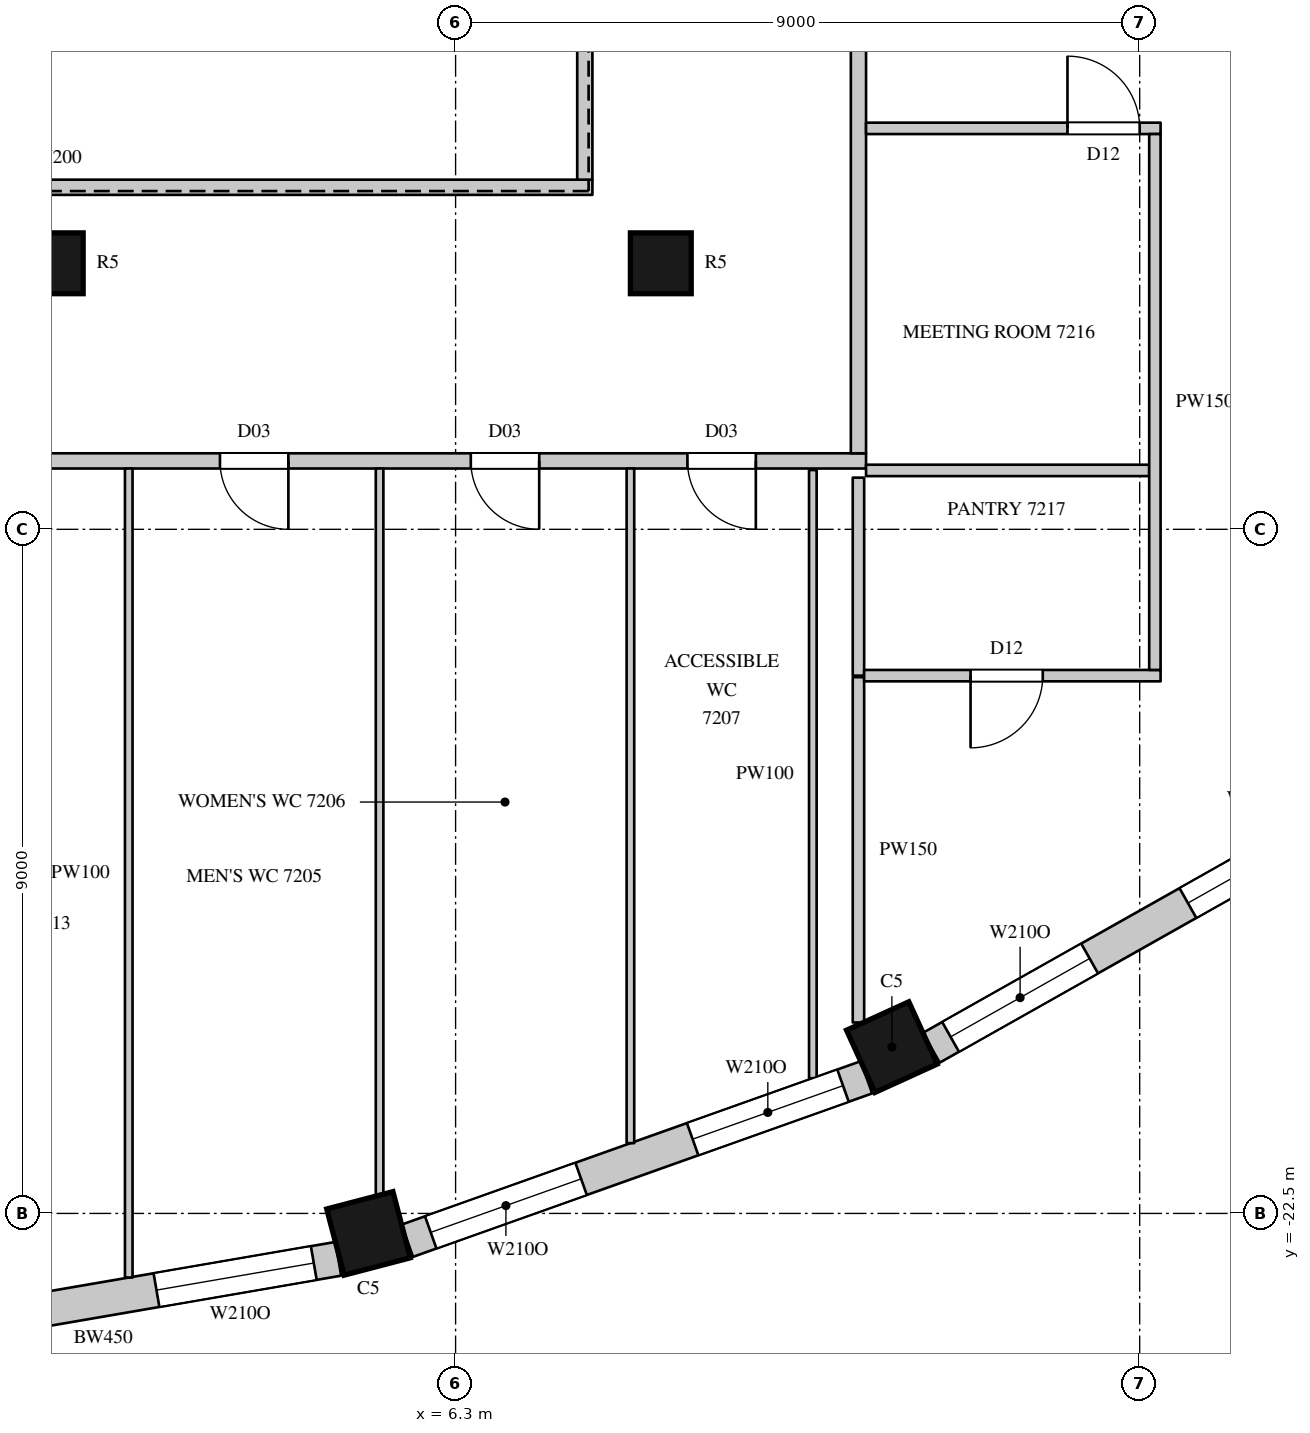
"""IFC4 building model, lengths in metres.
Left out: names, types, materials, properties, quantities, classifications, styles, units other than length and angle.
Written with IfcOpenShell. Run it as: python <this file> out.ifc"""

import sys

from ifc_helpers import new_model, si_unit, direction, frame, frame_2d, origin, origin_2d, place, context, subcontext, project, spatial, rectangle, circle, extrude, element, fill, save


model = new_model("IFC4")
c1 = context("Model", 3, precision=1e-05, world=origin(), true_north=direction((0.0, 1.0)))
c2 = subcontext(c1, "Body", "Model", "MODEL_VIEW")
j1 = project(units=[si_unit("LENGTHUNIT", "METRE"), si_unit("PLANEANGLEUNIT", "RADIAN")], contexts=[c1])
p1 = place(None, origin())
s1 = spatial("IfcSite", under=j1, at=p1, CompositionType="ELEMENT")
p2 = place(p1, origin())
s2 = spatial("IfcBuilding", under=s1, at=p2, CompositionType="ELEMENT")
p3 = place(p2, frame((0.0, 0.0, 317.2)))
s3 = spatial("IfcBuildingStorey", under=s2, at=p3, CompositionType="ELEMENT", Elevation=317.2)
for number, where, z_axis, x_axis in (
    (1, (5.154, -22.763, 0.0), (0.0, 0.0, 1.0), (0.967, 0.253, 0.0)),
    (2, (12.04, -20.312, 0.0), (0.0, 0.0, 1.0), (0.91, 0.415, 0.0)),
):
    element("IfcColumn", number, at=place(p3, frame(where, z_axis=z_axis, x_axis=x_axis)), inside=s3, PredefinedType="COLUMN", context=c2, shape_type="SweptSolid", body=[
        extrude(rectangle(XDim=0.9, YDim=0.9, at=origin_2d()), origin(), (0.0, 0.0, 1.0), 4.1),
    ])
for number, where, z_axis, x_axis in (
    (3, (1.0, -10.0, 0.0), (0.0, 0.0, 1.0), (1.0, 0.0, 0.0)),
    (4, (9.0, -10.0, 0.0), (0.0, 0.0, 1.0), (1.0, 0.0, 0.0)),
):
    element("IfcColumn", number, at=place(p3, frame(where, z_axis=z_axis, x_axis=x_axis)), inside=s3, PredefinedType="COLUMN", context=c2, shape_type="SweptSolid", body=[
        extrude(circle(Radius=0.4, at=origin_2d()), origin(), (0.0, 0.0, 1.0), 4.1),
    ])
p4 = place(p3, frame((-1.562, -24.185, 0.0), z_axis=(0.0, 0.0, 1.0), x_axis=(0.985502073964, 0.169663379113, 0.0)))
e5 = element("IfcWall", 5, at=p4, inside=s3, PredefinedType="SOLIDWALL", context=c2, shape_type="SweptSolid", body=[
    extrude(rectangle(XDim=6.412, YDim=0.45, at=frame_2d((3.206, 0.0))), origin(), (0.0, 0.0, 1.0), 3.8),
])
p5 = place(p4, frame((0.327, 0.0, 1.05)))
e6 = element("IfcOpeningElement", 6, at=p5, cuts=e5, PredefinedType="OPENING", context=c2, shape_type="SweptSolid", body=[
    extrude(rectangle(XDim=2.1, YDim=2.4, at=frame_2d((1.05, 1.2))), frame((0.0, 0.235, 0.0), z_axis=(0.0, -1.0, 0.0), x_axis=(1.0, 0.0, 0.0)), (0.0, 0.0, 1.0), 0.47),
])
p6 = place(p4, frame((3.985, 0.0, 1.05)))
e7 = element("IfcOpeningElement", 7, at=p6, cuts=e5, PredefinedType="OPENING", context=c2, shape_type="SweptSolid", body=[
    extrude(rectangle(XDim=2.1, YDim=2.4, at=frame_2d((1.05, 1.2))), frame((0.0, 0.235, 0.0), z_axis=(0.0, -1.0, 0.0), x_axis=(1.0, 0.0, 0.0)), (0.0, 0.0, 1.0), 0.47),
])
p7 = place(p3, frame((5.665, -22.859, 0.0), z_axis=(0.0, 0.0, 1.0), x_axis=(0.942108340262, 0.335308626803, 0.0)))
e8 = element("IfcWall", 8, at=p7, inside=s3, PredefinedType="SOLIDWALL", context=c2, shape_type="SweptSolid", body=[
    extrude(rectangle(XDim=6.412, YDim=0.45, at=frame_2d((3.206, 0.0))), origin(), (0.0, 0.0, 1.0), 3.8),
])
p8 = place(p7, frame((0.327, 0.0, 1.05)))
e9 = element("IfcOpeningElement", 9, at=p8, cuts=e8, PredefinedType="OPENING", context=c2, shape_type="SweptSolid", body=[
    extrude(rectangle(XDim=2.1, YDim=2.4, at=frame_2d((1.05, 1.2))), frame((0.0, 0.235, 0.0), z_axis=(0.0, -1.0, 0.0), x_axis=(1.0, 0.0, 0.0)), (0.0, 0.0, 1.0), 0.47),
])
p9 = place(p7, frame((3.985, 0.0, 1.05)))
e10 = element("IfcOpeningElement", 10, at=p9, cuts=e8, PredefinedType="OPENING", context=c2, shape_type="SweptSolid", body=[
    extrude(rectangle(XDim=2.1, YDim=2.4, at=frame_2d((1.05, 1.2))), frame((0.0, 0.235, 0.0), z_axis=(0.0, -1.0, 0.0), x_axis=(1.0, 0.0, 0.0)), (0.0, 0.0, 1.0), 0.47),
])
p10 = place(p3, frame((12.559, -20.32, 0.0), z_axis=(0.0, 0.0, 1.0), x_axis=(0.871065783524, 0.491166367714, 0.0)))
e11 = element("IfcWall", 11, at=p10, inside=s3, PredefinedType="SOLIDWALL", context=c2, shape_type="SweptSolid", body=[
    extrude(rectangle(XDim=6.196, YDim=0.45, at=frame_2d((3.098, 0.0))), origin(), (0.0, 0.0, 1.0), 3.8),
])
p11 = place(p10, frame((0.291, 0.0, 1.05)))
e12 = element("IfcOpeningElement", 12, at=p11, cuts=e11, PredefinedType="OPENING", context=c2, shape_type="SweptSolid", body=[
    extrude(rectangle(XDim=2.1, YDim=2.4, at=frame_2d((1.05, 1.2))), frame((0.0, 0.235, 0.0), z_axis=(0.0, -1.0, 0.0), x_axis=(1.0, 0.0, 0.0)), (0.0, 0.0, 1.0), 0.47),
])
p12 = place(p10, frame((3.875, 0.0, 1.05)))
e13 = element("IfcOpeningElement", 13, at=p12, cuts=e11, PredefinedType="OPENING", context=c2, shape_type="SweptSolid", body=[
    extrude(rectangle(XDim=2.1, YDim=2.4, at=frame_2d((1.05, 1.2))), frame((0.0, 0.235, 0.0), z_axis=(0.0, -1.0, 0.0), x_axis=(1.0, 0.0, 0.0)), (0.0, 0.0, 1.0), 0.47),
])
p13 = place(p3, frame((-10.9, -12.6, 0.0), z_axis=(0.0, 0.0, 1.0), x_axis=(1.0, 0.0, 0.0)))
e14 = element("IfcWall", 14, at=p13, inside=s3, PredefinedType="PARTITIONING", context=c2, shape_type="SweptSolid", body=[
    extrude(rectangle(XDim=22.6, YDim=0.2, at=frame_2d((11.3, 0.0))), origin(), (0.0, 0.0, 1.0), 3.8),
])
p14 = place(p13, frame((14.1, 0.0, 0.0)))
e15 = element("IfcOpeningElement", 15, at=p14, cuts=e14, PredefinedType="OPENING", context=c2, shape_type="SweptSolid", body=[
    extrude(rectangle(XDim=0.9, YDim=2.2, at=frame_2d((0.45, 1.1))), frame((0.0, 0.11, 0.0), z_axis=(0.0, -1.0, 0.0), x_axis=(1.0, 0.0, 0.0)), (0.0, 0.0, 1.0), 0.22),
])
p15 = place(p13, frame((17.4, 0.0, 0.0)))
e16 = element("IfcOpeningElement", 16, at=p15, cuts=e14, PredefinedType="OPENING", context=c2, shape_type="SweptSolid", body=[
    extrude(rectangle(XDim=0.9, YDim=2.2, at=frame_2d((0.45, 1.1))), frame((0.0, 0.11, 0.0), z_axis=(0.0, -1.0, 0.0), x_axis=(1.0, 0.0, 0.0)), (0.0, 0.0, 1.0), 0.22),
])
p16 = place(p13, frame((20.25, 0.0, 0.0)))
e17 = element("IfcOpeningElement", 17, at=p16, cuts=e14, PredefinedType="OPENING", context=c2, shape_type="SweptSolid", body=[
    extrude(rectangle(XDim=0.9, YDim=2.2, at=frame_2d((0.45, 1.1))), frame((0.0, 0.11, 0.0), z_axis=(0.0, -1.0, 0.0), x_axis=(1.0, 0.0, 0.0)), (0.0, 0.0, 1.0), 0.22),
])
p17 = place(p13, frame((1.95, 0.0, 0.0)))
e18 = element("IfcOpeningElement", 18, at=p17, cuts=e14, PredefinedType="OPENING", context=c2, shape_type="SweptSolid", body=[
    extrude(rectangle(XDim=1.1, YDim=2.4, at=frame_2d((0.55, 1.2))), frame((0.0, 0.11, 0.0), z_axis=(0.0, -1.0, 0.0), x_axis=(1.0, 0.0, 0.0)), (0.0, 0.0, 1.0), 0.22),
])
p18 = place(p13, frame((9.95, 0.0, 0.0)))
e19 = element("IfcOpeningElement", 19, at=p18, cuts=e14, PredefinedType="OPENING", context=c2, shape_type="SweptSolid", body=[
    extrude(rectangle(XDim=1.1, YDim=2.4, at=frame_2d((0.55, 1.2))), frame((0.0, 0.11, 0.0), z_axis=(0.0, -1.0, 0.0), x_axis=(1.0, 0.0, 0.0)), (0.0, 0.0, 1.0), 0.22),
])
p19 = place(p3, frame((-6.1, -9.0, 0.0), z_axis=(0.0, 0.0, 1.0), x_axis=(1.0, 0.0, 0.0)))
e20 = element("IfcWall", 20, at=p19, inside=s3, PredefinedType="PARTITIONING", context=c2, shape_type="SweptSolid", body=[
    extrude(rectangle(XDim=14.2, YDim=0.2, at=frame_2d((7.1, 0.0))), origin(), (0.0, 0.0, 1.0), 3.8),
])
p20 = place(p3, frame((8.0, -8.9, 0.0), z_axis=(0.0, 0.0, 1.0), x_axis=(0.0, 1.0, 0.0)))
e21 = element("IfcWall", 21, at=p20, inside=s3, PredefinedType="PARTITIONING", context=c2, shape_type="SweptSolid", body=[
    extrude(rectangle(XDim=8.88, YDim=0.2, at=frame_2d((4.44, 0.0))), origin(), (0.0, 0.0, 1.0), 3.8),
])
p21 = place(p3, frame((11.6, -12.5, 0.0), z_axis=(0.0, 0.0, 1.0), x_axis=(0.0, 1.0, 0.0)))
e22 = element("IfcWall", 22, at=p21, inside=s3, PredefinedType="PARTITIONING", context=c2, shape_type="SweptSolid", body=[
    extrude(rectangle(XDim=25.0, YDim=0.2, at=frame_2d((12.5, 0.0))), origin(), (0.0, 0.0, 1.0), 3.8),
])
p22 = place(p21, frame((9.4, 0.0, 0.0)))
e23 = element("IfcOpeningElement", 23, at=p22, cuts=e22, PredefinedType="OPENING", context=c2, shape_type="SweptSolid", body=[
    extrude(rectangle(XDim=1.5, YDim=2.4, at=frame_2d((0.75, 1.2))), frame((0.0, 0.11, 0.0), z_axis=(0.0, -1.0, 0.0), x_axis=(1.0, 0.0, 0.0)), (0.0, 0.0, 1.0), 0.22),
])
p23 = place(p21, frame((5.5, 0.0, 0.0)))
e24 = element("IfcOpeningElement", 24, at=p23, cuts=e22, PredefinedType="OPENING", context=c2, shape_type="SweptSolid", body=[
    extrude(rectangle(XDim=1.1, YDim=2.4, at=frame_2d((0.55, 1.2))), frame((0.0, 0.11, 0.0), z_axis=(0.0, -1.0, 0.0), x_axis=(1.0, 0.0, 0.0)), (0.0, 0.0, 1.0), 0.22),
])
p24 = place(p3, frame((11.6, -19.988, 0.0), z_axis=(0.0, 0.0, 1.0), x_axis=(0.0, 1.0, 0.0)))
e25 = element("IfcWall", 25, at=p24, inside=s3, PredefinedType="PARTITIONING", context=c2, shape_type="SweptSolid", body=[
    extrude(rectangle(XDim=4.543, YDim=0.15, at=frame_2d((2.271, 0.0))), origin(), (0.0, 0.0, 1.0), 3.8),
])
p25 = place(p3, frame((11.6, -15.425, 0.0), z_axis=(0.0, 0.0, 1.0), x_axis=(0.0, 1.0, 0.0)))
e26 = element("IfcWall", 26, at=p25, inside=s3, PredefinedType="PARTITIONING", context=c2, shape_type="SweptSolid", body=[
    extrude(rectangle(XDim=2.605, YDim=0.15, at=frame_2d((1.302, 0.0))), origin(), (0.0, 0.0, 1.0), 3.8),
])
p26 = place(p3, frame((11.675, -15.425, 0.0), z_axis=(0.0, 0.0, 1.0), x_axis=(1.0, 0.0, 0.0)))
e27 = element("IfcWall", 27, at=p26, inside=s3, PredefinedType="PARTITIONING", context=c2, shape_type="SweptSolid", body=[
    extrude(rectangle(XDim=3.9, YDim=0.15, at=frame_2d((1.95, 0.0))), origin(), (0.0, 0.0, 1.0), 3.8),
])
p27 = place(p26, frame((1.4, 0.0, 0.0)))
e28 = element("IfcOpeningElement", 28, at=p27, cuts=e27, PredefinedType="OPENING", context=c2, shape_type="SweptSolid", body=[
    extrude(rectangle(XDim=0.95, YDim=2.2, at=frame_2d((0.475, 1.1))), frame((0.0, 0.085, 0.0), z_axis=(0.0, -1.0, 0.0), x_axis=(1.0, 0.0, 0.0)), (0.0, 0.0, 1.0), 0.17),
])
p28 = place(p3, frame((11.7, -12.725, 0.0), z_axis=(0.0, 0.0, 1.0), x_axis=(1.0, 0.0, 0.0)))
e29 = element("IfcWall", 29, at=p28, inside=s3, PredefinedType="PARTITIONING", context=c2, shape_type="SweptSolid", body=[
    extrude(rectangle(XDim=3.725, YDim=0.15, at=frame_2d((1.863, 0.0))), origin(), (0.0, 0.0, 1.0), 3.8),
])
p29 = place(p3, frame((11.7, -8.225, 0.0), z_axis=(0.0, 0.0, 1.0), x_axis=(1.0, 0.0, 0.0)))
e30 = element("IfcWall", 30, at=p29, inside=s3, PredefinedType="PARTITIONING", context=c2, shape_type="SweptSolid", body=[
    extrude(rectangle(XDim=3.875, YDim=0.15, at=frame_2d((1.938, 0.0))), origin(), (0.0, 0.0, 1.0), 3.15),
])
p30 = place(p29, frame((2.65, 0.0, 0.0)))
e31 = element("IfcOpeningElement", 31, at=p30, cuts=e30, PredefinedType="OPENING", context=c2, shape_type="SweptSolid", body=[
    extrude(rectangle(XDim=0.95, YDim=2.2, at=frame_2d((0.475, 1.1))), frame((0.0, 0.085, 0.0), z_axis=(0.0, -1.0, 0.0), x_axis=(1.0, 0.0, 0.0)), (0.0, 0.0, 1.0), 0.17),
])
p31 = place(p3, frame((15.5, -15.35, 0.0), z_axis=(0.0, 0.0, 1.0), x_axis=(0.0, 1.0, 0.0)))
e32 = element("IfcWall", 32, at=p31, inside=s3, PredefinedType="PARTITIONING", context=c2, shape_type="SweptSolid", body=[
    extrude(rectangle(XDim=7.05, YDim=0.15, at=frame_2d((3.525, 0.0))), origin(), (0.0, 0.0, 1.0), 3.8),
])
p32 = place(p3, frame((2.0, -23.344, 0.0), z_axis=(0.0, 0.0, 1.0), x_axis=(0.0, 1.0, 0.0)))
e33 = element("IfcWall", 33, at=p32, inside=s3, PredefinedType="PARTITIONING", context=c2, shape_type="SweptSolid", body=[
    extrude(rectangle(XDim=10.644, YDim=0.1, at=frame_2d((5.322, 0.0))), origin(), (0.0, 0.0, 1.0), 3.8),
])
p33 = place(p3, frame((5.3, -22.25, 0.0), z_axis=(0.0, 0.0, 1.0), x_axis=(0.0, 1.0, 0.0)))
e34 = element("IfcWall", 34, at=p33, inside=s3, PredefinedType="PARTITIONING", context=c2, shape_type="SweptSolid", body=[
    extrude(rectangle(XDim=9.55, YDim=0.1, at=frame_2d((4.775, 0.0))), origin(), (0.0, 0.0, 1.0), 3.8),
])
p34 = place(p3, frame((8.6, -21.576, 0.0), z_axis=(0.0, 0.0, 1.0), x_axis=(0.0, 1.0, 0.0)))
e35 = element("IfcWall", 35, at=p34, inside=s3, PredefinedType="PARTITIONING", context=c2, shape_type="SweptSolid", body=[
    extrude(rectangle(XDim=8.876, YDim=0.1, at=frame_2d((4.438, 0.0))), origin(), (0.0, 0.0, 1.0), 3.8),
])
p35 = place(p3, frame((11.0, -20.721, 0.0), z_axis=(0.0, 0.0, 1.0), x_axis=(0.0, 1.0, 0.0)))
e36 = element("IfcWall", 36, at=p35, inside=s3, PredefinedType="PARTITIONING", context=c2, shape_type="SweptSolid", body=[
    extrude(rectangle(XDim=8.001, YDim=0.1, at=frame_2d((4.001, 0.0))), origin(), (0.0, 0.0, 1.0), 3.8),
])
p36 = place(p6, origin())
e37 = element("IfcWindow", 37, at=p36, inside=s3, PartitioningType="SINGLE_PANEL", PredefinedType="WINDOW", context=c2, shape_type="SweptSolid", body=[
    extrude(rectangle(XDim=2.1, YDim=2.4, at=frame_2d((1.05, 1.2))), frame((0.0, 0.135, 0.0), z_axis=(0.0, -1.0, 0.0), x_axis=(1.0, 0.0, 0.0)), (0.0, 0.0, 1.0), 0.06),
])
fill(e7, e37)
p37 = place(p8, origin())
e38 = element("IfcWindow", 38, at=p37, inside=s3, PartitioningType="SINGLE_PANEL", PredefinedType="WINDOW", context=c2, shape_type="SweptSolid", body=[
    extrude(rectangle(XDim=2.1, YDim=2.4, at=frame_2d((1.05, 1.2))), frame((0.0, 0.135, 0.0), z_axis=(0.0, -1.0, 0.0), x_axis=(1.0, 0.0, 0.0)), (0.0, 0.0, 1.0), 0.06),
])
fill(e9, e38)
p38 = place(p9, origin())
e39 = element("IfcWindow", 39, at=p38, inside=s3, PartitioningType="SINGLE_PANEL", PredefinedType="WINDOW", context=c2, shape_type="SweptSolid", body=[
    extrude(rectangle(XDim=2.1, YDim=2.4, at=frame_2d((1.05, 1.2))), frame((0.0, 0.135, 0.0), z_axis=(0.0, -1.0, 0.0), x_axis=(1.0, 0.0, 0.0)), (0.0, 0.0, 1.0), 0.06),
])
fill(e10, e39)
p39 = place(p11, origin())
e40 = element("IfcWindow", 40, at=p39, inside=s3, PartitioningType="SINGLE_PANEL", PredefinedType="WINDOW", context=c2, shape_type="SweptSolid", body=[
    extrude(rectangle(XDim=2.1, YDim=2.4, at=frame_2d((1.05, 1.2))), frame((0.0, 0.135, 0.0), z_axis=(0.0, -1.0, 0.0), x_axis=(1.0, 0.0, 0.0)), (0.0, 0.0, 1.0), 0.06),
])
fill(e12, e40)
p40 = place(p12, origin())
e41 = element("IfcWindow", 41, at=p40, inside=s3, PartitioningType="SINGLE_PANEL", PredefinedType="WINDOW", context=c2, shape_type="SweptSolid", body=[
    extrude(rectangle(XDim=2.1, YDim=2.4, at=frame_2d((1.05, 1.2))), frame((0.0, 0.135, 0.0), z_axis=(0.0, -1.0, 0.0), x_axis=(1.0, 0.0, 0.0)), (0.0, 0.0, 1.0), 0.06),
])
fill(e13, e41)
p41 = place(p14, origin())
e42 = element("IfcDoor", 42, at=p41, inside=s3, OperationType="SINGLE_SWING_LEFT", PredefinedType="DOOR", context=c2, shape_type="SweptSolid", body=[
    extrude(rectangle(XDim=0.9, YDim=2.2, at=frame_2d((0.45, 1.1))), frame((0.0, 0.025, 0.0), z_axis=(0.0, -1.0, 0.0), x_axis=(1.0, 0.0, 0.0)), (0.0, 0.0, 1.0), 0.05),
])
fill(e15, e42)
p42 = place(p15, origin())
e43 = element("IfcDoor", 43, at=p42, inside=s3, OperationType="SINGLE_SWING_LEFT", PredefinedType="DOOR", context=c2, shape_type="SweptSolid", body=[
    extrude(rectangle(XDim=0.9, YDim=2.2, at=frame_2d((0.45, 1.1))), frame((0.0, 0.025, 0.0), z_axis=(0.0, -1.0, 0.0), x_axis=(1.0, 0.0, 0.0)), (0.0, 0.0, 1.0), 0.05),
])
fill(e16, e43)
p43 = place(p16, origin())
e44 = element("IfcDoor", 44, at=p43, inside=s3, OperationType="SINGLE_SWING_LEFT", PredefinedType="DOOR", context=c2, shape_type="SweptSolid", body=[
    extrude(rectangle(XDim=0.9, YDim=2.2, at=frame_2d((0.45, 1.1))), frame((0.0, 0.025, 0.0), z_axis=(0.0, -1.0, 0.0), x_axis=(1.0, 0.0, 0.0)), (0.0, 0.0, 1.0), 0.05),
])
fill(e17, e44)
p44 = place(p30, origin())
e45 = element("IfcDoor", 45, at=p44, inside=s3, OperationType="SINGLE_SWING_LEFT", PredefinedType="DOOR", context=c2, shape_type="SweptSolid", body=[
    extrude(rectangle(XDim=0.95, YDim=2.2, at=frame_2d((0.475, 1.1))), frame((0.0, 0.025, 0.0), z_axis=(0.0, -1.0, 0.0), x_axis=(1.0, 0.0, 0.0)), (0.0, 0.0, 1.0), 0.05),
])
fill(e31, e45)
p45 = place(p27, origin())
e46 = element("IfcDoor", 46, at=p45, inside=s3, OperationType="SINGLE_SWING_RIGHT", PredefinedType="DOOR", context=c2, shape_type="SweptSolid", body=[
    extrude(rectangle(XDim=0.95, YDim=2.2, at=frame_2d((0.475, 1.1))), frame((0.0, 0.025, 0.0), z_axis=(0.0, -1.0, 0.0), x_axis=(1.0, 0.0, 0.0)), (0.0, 0.0, 1.0), 0.05),
])
fill(e28, e46)
save(model, sys.argv[1])
